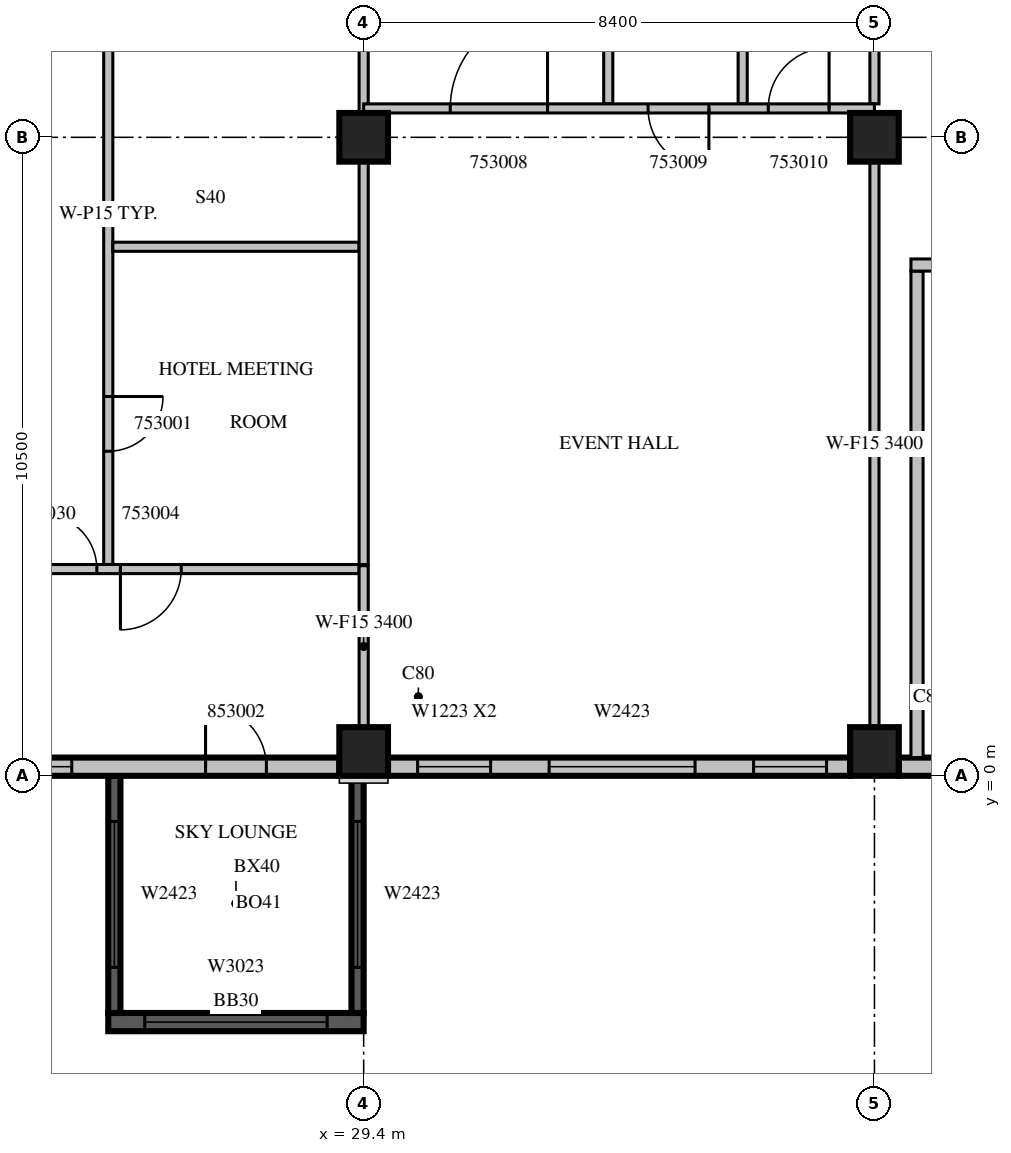
"""IFC4 building model, lengths in metres.
Left out: names, types, materials, properties, quantities, classifications, styles, units other than length and angle.
Written with IfcOpenShell. Run it as: python <this file> out.ifc"""

import sys

from ifc_helpers import new_model, si_unit, direction, frame, frame_2d, origin, origin_2d, place, context, subcontext, project, spatial, rectangle, extrude, source, transform, mapped, element, fill, save


model = new_model("IFC4")
c1 = context("Model", 3, precision=1e-05, world=origin(), true_north=direction((0.0, 1.0)))
c2 = subcontext(c1, "Body", "Model", "MODEL_VIEW")
j1 = project(units=[si_unit("LENGTHUNIT", "METRE"), si_unit("PLANEANGLEUNIT", "RADIAN")], contexts=[c1])
p1 = place(None, origin())
s1 = spatial("IfcSite", under=j1, at=p1, CompositionType="ELEMENT")
p2 = place(p1, origin())
s2 = spatial("IfcBuilding", under=s1, at=p2, CompositionType="ELEMENT")
p3 = place(p2, frame((0.0, 0.0, 234.8)))
s3 = spatial("IfcBuildingStorey", under=s2, at=p3, CompositionType="ELEMENT", Elevation=234.8)
m1 = source(origin(), c2, "Body", "SweptSolid", [
    extrude(rectangle(XDim=0.8, YDim=0.8, at=origin_2d()), origin(), (0.0, 0.0, 1.0), 3.8),
])
for number, where, z_axis, x_axis in (
    (1, (29.4, 0.4, 0.0), (0.0, 0.0, 1.0), (1.0, 0.0, 0.0)),
    (2, (37.8, 0.4, 0.0), (0.0, 0.0, 1.0), (1.0, 0.0, 0.0)),
    (3, (29.4, 10.5, 0.0), (0.0, 0.0, 1.0), (1.0, 0.0, 0.0)),
    (4, (37.8, 10.5, 0.0), (0.0, 0.0, 1.0), (1.0, 0.0, 0.0)),
):
    element("IfcColumn", number, at=place(p3, frame(where, z_axis=z_axis, x_axis=x_axis)), inside=s3, PredefinedType="COLUMN", context=c2, shape_type="MappedRepresentation", body=[
        mapped(m1, transform((0.0, 0.0, 0.0), scale=1.0)),
    ])
m2 = source(origin(), c2, "Body", "SweptSolid", [
    extrude(rectangle(XDim=4.2, YDim=0.3, at=frame_2d((2.1, 0.0))), origin(), (0.0, 0.0, 1.0), 3.4),
])
p4 = place(p3, frame((25.2, -4.05, 0.0), z_axis=(0.0, 0.0, 1.0), x_axis=(1.0, 0.0, 0.0)))
e5 = element("IfcWall", 5, at=p4, inside=s3, PredefinedType="SOLIDWALL", context=c2, shape_type="MappedRepresentation", body=[
    mapped(m2, transform((0.0, 0.0, 0.0), scale=1.0)),
])
m3 = source(origin(), c2, "Body", "SweptSolid", [
    extrude(rectangle(XDim=3.0, YDim=2.3, at=frame_2d((1.5, 1.15))), frame((0.0, 0.16, 0.0), z_axis=(0.0, -1.0, 0.0), x_axis=(1.0, 0.0, 0.0)), (0.0, 0.0, 1.0), 0.32),
])
p5 = place(p4, frame((0.6, 0.0, 0.6)))
e6 = element("IfcOpeningElement", 6, at=p5, cuts=e5, PredefinedType="OPENING", context=c2, shape_type="MappedRepresentation", body=[
    mapped(m3, transform((0.0, 0.0, 0.0), scale=1.0)),
])
m4 = source(origin(), c2, "Body", "SweptSolid", [
    extrude(rectangle(XDim=3.9, YDim=0.2, at=frame_2d((1.95, 0.0))), origin(), (0.0, 0.0, 1.0), 3.4),
])
p6 = place(p3, frame((25.3, 0.0, 0.0), z_axis=(0.0, 0.0, 1.0), x_axis=(0.0, -1.0, 0.0)))
e7 = element("IfcWall", 7, at=p6, inside=s3, PredefinedType="SOLIDWALL", context=c2, shape_type="MappedRepresentation", body=[
    mapped(m4, transform((0.0, 0.0, 0.0), scale=1.0)),
])
m5 = source(origin(), c2, "Body", "SweptSolid", [
    extrude(rectangle(XDim=2.4, YDim=2.3, at=frame_2d((1.2, 1.15))), frame((0.0, 0.11, 0.0), z_axis=(0.0, -1.0, 0.0), x_axis=(1.0, 0.0, 0.0)), (0.0, 0.0, 1.0), 0.22),
])
p7 = place(p6, frame((0.75, 0.0, 0.6)))
e8 = element("IfcOpeningElement", 8, at=p7, cuts=e7, PredefinedType="OPENING", context=c2, shape_type="MappedRepresentation", body=[
    mapped(m5, transform((0.0, 0.0, 0.0), scale=1.0)),
])
p8 = place(p3, frame((29.3, 0.0, 0.0), z_axis=(0.0, 0.0, 1.0), x_axis=(0.0, -1.0, 0.0)))
e9 = element("IfcWall", 9, at=p8, inside=s3, PredefinedType="SOLIDWALL", context=c2, shape_type="MappedRepresentation", body=[
    mapped(m4, transform((0.0, 0.0, 0.0), scale=1.0)),
])
p9 = place(p8, frame((0.75, 0.0, 0.6)))
e10 = element("IfcOpeningElement", 10, at=p9, cuts=e9, PredefinedType="OPENING", context=c2, shape_type="MappedRepresentation", body=[
    mapped(m5, transform((0.0, 0.0, 0.0), scale=1.0)),
])
m6 = source(origin(), c2, "Body", "SweptSolid", [
    extrude(rectangle(XDim=7.6, YDim=0.3, at=frame_2d((3.8, 0.0))), origin(), (0.0, 0.0, 1.0), 3.4),
])
p10 = place(p3, frame((21.4, 0.15, 0.0), z_axis=(0.0, 0.0, 1.0), x_axis=(1.0, 0.0, 0.0)))
e11 = element("IfcWall", 11, at=p10, inside=s3, PredefinedType="STANDARD", context=c2, shape_type="MappedRepresentation", body=[
    mapped(m6, transform((0.0, 0.0, 0.0), scale=1.0)),
])
p11 = place(p10, frame((0.2, 0.0, 0.6)))
e12 = element("IfcOpeningElement", 12, at=p11, cuts=e11, PredefinedType="OPENING", context=c2, shape_type="MappedRepresentation", body=[
    mapped(m3, transform((0.0, 0.0, 0.0), scale=1.0)),
])
m7 = source(origin(), c2, "Body", "SweptSolid", [
    extrude(rectangle(XDim=1.0, YDim=2.1, at=frame_2d((0.5, 1.05))), frame((0.0, 0.16, 0.0), z_axis=(0.0, -1.0, 0.0), x_axis=(1.0, 0.0, 0.0)), (0.0, 0.0, 1.0), 0.32),
])
p12 = place(p10, frame((5.4, 0.0, 0.0)))
e13 = element("IfcOpeningElement", 13, at=p12, cuts=e11, PredefinedType="OPENING", context=c2, shape_type="MappedRepresentation", body=[
    mapped(m7, transform((0.0, 0.0, 0.0), scale=1.0)),
])
p13 = place(p3, frame((29.8, 0.15, 0.0), z_axis=(0.0, 0.0, 1.0), x_axis=(1.0, 0.0, 0.0)))
e14 = element("IfcWall", 14, at=p13, inside=s3, PredefinedType="STANDARD", context=c2, shape_type="MappedRepresentation", body=[
    mapped(m6, transform((0.0, 0.0, 0.0), scale=1.0)),
])
m8 = source(origin(), c2, "Body", "SweptSolid", [
    extrude(rectangle(XDim=1.2, YDim=2.3, at=frame_2d((0.6, 1.15))), frame((0.0, 0.16, 0.0), z_axis=(0.0, -1.0, 0.0), x_axis=(1.0, 0.0, 0.0)), (0.0, 0.0, 1.0), 0.32),
])
p14 = place(p13, frame((0.487, 0.0, 0.6)))
e15 = element("IfcOpeningElement", 15, at=p14, cuts=e14, PredefinedType="OPENING", context=c2, shape_type="MappedRepresentation", body=[
    mapped(m8, transform((0.0, 0.0, 0.0), scale=1.0)),
])
p15 = place(p13, frame((6.013, 0.0, 0.6)))
e16 = element("IfcOpeningElement", 16, at=p15, cuts=e14, PredefinedType="OPENING", context=c2, shape_type="MappedRepresentation", body=[
    mapped(m8, transform((0.0, 0.0, 0.0), scale=1.0)),
])
m9 = source(origin(), c2, "Body", "SweptSolid", [
    extrude(rectangle(XDim=2.4, YDim=2.3, at=frame_2d((1.2, 1.15))), frame((0.0, 0.16, 0.0), z_axis=(0.0, -1.0, 0.0), x_axis=(1.0, 0.0, 0.0)), (0.0, 0.0, 1.0), 0.32),
])
p16 = place(p13, frame((2.65, 0.0, 0.6)))
e17 = element("IfcOpeningElement", 17, at=p16, cuts=e14, PredefinedType="OPENING", context=c2, shape_type="MappedRepresentation", body=[
    mapped(m9, transform((0.0, 0.0, 0.0), scale=1.0)),
])
m10 = source(origin(), c2, "Body", "SweptSolid", [
    extrude(rectangle(XDim=2.0, YDim=0.3, at=frame_2d((1.0, 0.0))), origin(), (0.0, 0.0, 1.0), 3.4),
])
p17 = place(p3, frame((38.2, 0.15, 0.0), z_axis=(0.0, 0.0, 1.0), x_axis=(1.0, 0.0, 0.0)))
e18 = element("IfcWall", 18, at=p17, inside=s3, PredefinedType="STANDARD", context=c2, shape_type="MappedRepresentation", body=[
    mapped(m10, transform((0.0, 0.0, 0.0), scale=1.0)),
])
m11 = source(origin(), c2, "Body", "SweptSolid", [
    extrude(rectangle(XDim=8.0, YDim=0.2, at=frame_2d((4.0, 0.0))), origin(), (0.0, 0.0, 1.0), 3.4),
])
p18 = place(p3, frame((38.5, 0.3, 0.0), z_axis=(0.0, 0.0, 1.0), x_axis=(0.0, 1.0, 0.0)))
e19 = element("IfcWall", 19, at=p18, inside=s3, PredefinedType="PARTITIONING", context=c2, shape_type="MappedRepresentation", body=[
    mapped(m11, transform((0.0, 0.0, 0.0), scale=1.0)),
])
m12 = source(origin(), c2, "Body", "SweptSolid", [
    extrude(rectangle(XDim=5.45, YDim=0.2, at=frame_2d((2.725, 0.0))), origin(), (0.0, 0.0, 1.0), 3.4),
])
p19 = place(p3, frame((38.4, 8.4, 0.0), z_axis=(0.0, 0.0, 1.0), x_axis=(1.0, 0.0, 0.0)))
e20 = element("IfcWall", 20, at=p19, inside=s3, PredefinedType="PARTITIONING", context=c2, shape_type="MappedRepresentation", body=[
    mapped(m12, transform((0.0, 0.0, 0.0), scale=1.0)),
])
m13 = source(origin(), c2, "Body", "SweptSolid", [
    extrude(rectangle(XDim=1.2, YDim=2.1, at=frame_2d((0.6, 1.05))), frame((0.0, 0.11, 0.0), z_axis=(0.0, -1.0, 0.0), x_axis=(1.0, 0.0, 0.0)), (0.0, 0.0, 1.0), 0.22),
])
p20 = place(p19, frame((0.4, 0.0, 0.0)))
e21 = element("IfcOpeningElement", 21, at=p20, cuts=e20, PredefinedType="OPENING", context=c2, shape_type="MappedRepresentation", body=[
    mapped(m13, transform((0.0, 0.0, 0.0), scale=1.0)),
])
m14 = source(origin(), c2, "Body", "SweptSolid", [
    extrude(rectangle(XDim=0.9, YDim=2.1, at=frame_2d((0.45, 1.05))), frame((0.0, 0.11, 0.0), z_axis=(0.0, -1.0, 0.0), x_axis=(1.0, 0.0, 0.0)), (0.0, 0.0, 1.0), 0.22),
])
p21 = place(p19, frame((3.25, 0.0, 0.0)))
e22 = element("IfcOpeningElement", 22, at=p21, cuts=e20, PredefinedType="OPENING", context=c2, shape_type="MappedRepresentation", body=[
    mapped(m14, transform((0.0, 0.0, 0.0), scale=1.0)),
])
m15 = source(origin(), c2, "Body", "SweptSolid", [
    extrude(rectangle(XDim=11.525, YDim=0.15, at=frame_2d((5.763, 0.0))), origin(), (0.0, 0.0, 1.0), 3.4),
])
p22 = place(p3, frame((25.2, 15.0, 0.0), z_axis=(0.0, 0.0, 1.0), x_axis=(0.0, -1.0, 0.0)))
e23 = element("IfcWall", 23, at=p22, inside=s3, PredefinedType="PARTITIONING", context=c2, shape_type="MappedRepresentation", body=[
    mapped(m15, transform((0.0, 0.0, 0.0), scale=1.0)),
])
m16 = source(origin(), c2, "Body", "SweptSolid", [
    extrude(rectangle(XDim=0.9, YDim=2.1, at=frame_2d((0.45, 1.05))), frame((0.0, 0.085, 0.0), z_axis=(0.0, -1.0, 0.0), x_axis=(1.0, 0.0, 0.0)), (0.0, 0.0, 1.0), 0.17),
])
p23 = place(p22, frame((8.762, 0.0, 0.0)))
e24 = element("IfcOpeningElement", 24, at=p23, cuts=e23, PredefinedType="OPENING", context=c2, shape_type="MappedRepresentation", body=[
    mapped(m16, transform((0.0, 0.0, 0.0), scale=1.0)),
])
p24 = place(p22, frame((2.125, 0.0, 0.0)))
e25 = element("IfcOpeningElement", 25, at=p24, cuts=e23, PredefinedType="OPENING", context=c2, shape_type="MappedRepresentation", body=[
    mapped(m16, transform((0.0, 0.0, 0.0), scale=1.0)),
])
m17 = source(origin(), c2, "Body", "SweptSolid", [
    extrude(rectangle(XDim=4.05, YDim=0.15, at=frame_2d((2.025, 0.0))), origin(), (0.0, 0.0, 1.0), 3.4),
])
p25 = place(p3, frame((29.325, 8.7, 0.0), z_axis=(0.0, 0.0, 1.0), x_axis=(-1.0, 0.0, 0.0)))
e26 = element("IfcWall", 26, at=p25, inside=s3, PredefinedType="PARTITIONING", context=c2, shape_type="MappedRepresentation", body=[
    mapped(m17, transform((0.0, 0.0, 0.0), scale=1.0)),
])
m18 = source(origin(), c2, "Body", "SweptSolid", [
    extrude(rectangle(XDim=6.626, YDim=0.15, at=frame_2d((3.313, 0.0))), origin(), (0.0, 0.0, 1.0), 3.4),
])
p26 = place(p3, frame((29.4, 3.475, 0.0), z_axis=(0.0, 0.0, 1.0), x_axis=(0.0, 1.0, 0.0)))
e27 = element("IfcWall", 27, at=p26, inside=s3, PredefinedType="PARTITIONING", context=c2, shape_type="MappedRepresentation", body=[
    mapped(m18, transform((0.0, 0.0, 0.0), scale=1.0)),
])
m19 = source(origin(), c2, "Body", "SweptSolid", [
    extrude(rectangle(XDim=4.101, YDim=0.15, at=frame_2d((2.05, 0.0))), origin(), (0.0, 0.0, 1.0), 3.4),
])
p27 = place(p3, frame((29.4, 10.899, 0.0), z_axis=(0.0, 0.0, 1.0), x_axis=(0.0, 1.0, 0.0)))
e28 = element("IfcWall", 28, at=p27, inside=s3, PredefinedType="PARTITIONING", context=c2, shape_type="MappedRepresentation", body=[
    mapped(m19, transform((0.0, 0.0, 0.0), scale=1.0)),
])
m20 = source(origin(), c2, "Body", "SweptSolid", [
    extrude(rectangle(XDim=7.525, YDim=0.15, at=frame_2d((3.763, 0.0))), origin(), (0.0, 0.0, 1.0), 3.4),
])
p28 = place(p3, frame((21.8, 3.4, 0.0), z_axis=(0.0, 0.0, 1.0), x_axis=(1.0, 0.0, 0.0)))
e29 = element("IfcWall", 29, at=p28, inside=s3, PredefinedType="PARTITIONING", context=c2, shape_type="MappedRepresentation", body=[
    mapped(m20, transform((0.0, 0.0, 0.0), scale=1.0)),
])
m21 = source(origin(), c2, "Body", "SweptSolid", [
    extrude(rectangle(XDim=1.0, YDim=2.1, at=frame_2d((0.5, 1.05))), frame((0.0, 0.085, 0.0), z_axis=(0.0, -1.0, 0.0), x_axis=(1.0, 0.0, 0.0)), (0.0, 0.0, 1.0), 0.17),
])
p29 = place(p28, frame((3.6, 0.0, 0.0)))
e30 = element("IfcOpeningElement", 30, at=p29, cuts=e29, PredefinedType="OPENING", context=c2, shape_type="MappedRepresentation", body=[
    mapped(m21, transform((0.0, 0.0, 0.0), scale=1.0)),
])
p30 = place(p28, frame((2.312, 0.0, 0.0)))
e31 = element("IfcOpeningElement", 31, at=p30, cuts=e29, PredefinedType="OPENING", context=c2, shape_type="MappedRepresentation", body=[
    mapped(m16, transform((0.0, 0.0, 0.0), scale=1.0)),
])
m22 = source(origin(), c2, "Body", "SweptSolid", [
    extrude(rectangle(XDim=3.95, YDim=0.15, at=frame_2d((1.975, 0.0))), origin(), (0.0, 0.0, 1.0), 3.4),
])
for number, where, z_axis, x_axis in (
    (32, (33.422, 11.05, 0.0), (0.0, 0.0, 1.0), (0.0, 1.0, 0.0)),
    (33, (35.633, 11.05, 0.0), (0.0, 0.0, 1.0), (0.0, 1.0, 0.0)),
):
    element("IfcWall", number, at=place(p3, frame(where, z_axis=z_axis, x_axis=x_axis)), inside=s3, PredefinedType="PARTITIONING", context=c2, shape_type="MappedRepresentation", body=[
        mapped(m22, transform((0.0, 0.0, 0.0), scale=1.0)),
    ])
m23 = source(origin(), c2, "Body", "SweptSolid", [
    extrude(rectangle(XDim=2.656, YDim=0.15, at=frame_2d((1.328, 0.0))), origin(), (0.0, 0.0, 1.0), 3.4),
])
p31 = place(p3, frame((29.4, 0.799, 0.0), z_axis=(0.0, 0.0, 1.0), x_axis=(0.0, 1.0, 0.0)))
e34 = element("IfcWall", 34, at=p31, inside=s3, PredefinedType="PARTITIONING", context=c2, shape_type="MappedRepresentation", body=[
    mapped(m23, transform((0.0, 0.0, 0.0), scale=1.0)),
])
m24 = source(origin(), c2, "Body", "SweptSolid", [
    extrude(rectangle(XDim=9.302, YDim=0.15, at=frame_2d((4.651, 0.0))), origin(), (0.0, 0.0, 1.0), 3.4),
])
p32 = place(p3, frame((37.8, 0.799, 0.0), z_axis=(0.0, 0.0, 1.0), x_axis=(0.0, 1.0, 0.0)))
e35 = element("IfcWall", 35, at=p32, inside=s3, PredefinedType="PARTITIONING", context=c2, shape_type="MappedRepresentation", body=[
    mapped(m24, transform((0.0, 0.0, 0.0), scale=1.0)),
])
p33 = place(p3, frame((37.8, 11.05, 0.0), z_axis=(0.0, 0.0, 1.0), x_axis=(0.0, 1.0, 0.0)))
e36 = element("IfcWall", 36, at=p33, inside=s3, PredefinedType="PARTITIONING", context=c2, shape_type="MappedRepresentation", body=[
    mapped(m22, transform((0.0, 0.0, 0.0), scale=1.0)),
])
m25 = source(origin(), c2, "Body", "SweptSolid", [
    extrude(rectangle(XDim=8.4, YDim=0.15, at=frame_2d((4.2, 0.0))), origin(), (0.0, 0.0, 1.0), 3.4),
])
p34 = place(p3, frame((37.8, 10.975, 0.0), z_axis=(0.0, 0.0, 1.0), x_axis=(-1.0, 0.0, 0.0)))
e37 = element("IfcWall", 37, at=p34, inside=s3, PredefinedType="PARTITIONING", context=c2, shape_type="MappedRepresentation", body=[
    mapped(m25, transform((0.0, 0.0, 0.0), scale=1.0)),
])
m26 = source(origin(), c2, "Body", "SweptSolid", [
    extrude(rectangle(XDim=1.6, YDim=2.1, at=frame_2d((0.8, 1.05))), frame((0.0, 0.085, 0.0), z_axis=(0.0, -1.0, 0.0), x_axis=(1.0, 0.0, 0.0)), (0.0, 0.0, 1.0), 0.17),
])
p35 = place(p34, frame((5.376, 0.0, 0.0)))
e38 = element("IfcOpeningElement", 38, at=p35, cuts=e37, PredefinedType="OPENING", context=c2, shape_type="MappedRepresentation", body=[
    mapped(m26, transform((0.0, 0.0, 0.0), scale=1.0)),
])
p36 = place(p34, frame((2.722, 0.0, 0.0)))
e39 = element("IfcOpeningElement", 39, at=p36, cuts=e37, PredefinedType="OPENING", context=c2, shape_type="MappedRepresentation", body=[
    mapped(m21, transform((0.0, 0.0, 0.0), scale=1.0)),
])
p37 = place(p34, frame((0.746, 0.0, 0.0)))
e40 = element("IfcOpeningElement", 40, at=p37, cuts=e37, PredefinedType="OPENING", context=c2, shape_type="MappedRepresentation", body=[
    mapped(m21, transform((0.0, 0.0, 0.0), scale=1.0)),
])
m27 = source(origin(), c2, "Body", "SweptSolid", [
    extrude(rectangle(XDim=3.0, YDim=2.3, at=frame_2d((1.5, 1.15))), frame((0.0, 0.03, 0.0), z_axis=(0.0, -1.0, 0.0), x_axis=(1.0, 0.0, 0.0)), (0.0, 0.0, 1.0), 0.06),
])
p38 = place(p5, origin())
e41 = element("IfcWindow", 41, at=p38, inside=s3, PartitioningType="SINGLE_PANEL", PredefinedType="WINDOW", context=c2, shape_type="MappedRepresentation", body=[
    mapped(m27, transform((0.0, 0.0, 0.0), scale=1.0)),
])
fill(e6, e41)
m28 = source(origin(), c2, "Body", "SweptSolid", [
    extrude(rectangle(XDim=2.4, YDim=2.3, at=frame_2d((1.2, 1.15))), frame((0.0, 0.03, 0.0), z_axis=(0.0, -1.0, 0.0), x_axis=(1.0, 0.0, 0.0)), (0.0, 0.0, 1.0), 0.06),
])
p39 = place(p7, origin())
e42 = element("IfcWindow", 42, at=p39, inside=s3, PartitioningType="SINGLE_PANEL", PredefinedType="WINDOW", context=c2, shape_type="MappedRepresentation", body=[
    mapped(m28, transform((0.0, 0.0, 0.0), scale=1.0)),
])
fill(e8, e42)
p40 = place(p9, origin())
e43 = element("IfcWindow", 43, at=p40, inside=s3, PartitioningType="SINGLE_PANEL", PredefinedType="WINDOW", context=c2, shape_type="MappedRepresentation", body=[
    mapped(m28, transform((0.0, 0.0, 0.0), scale=1.0)),
])
fill(e10, e43)
p41 = place(p11, origin())
e44 = element("IfcWindow", 44, at=p41, inside=s3, PartitioningType="SINGLE_PANEL", PredefinedType="WINDOW", context=c2, shape_type="MappedRepresentation", body=[
    mapped(m27, transform((0.0, 0.0, 0.0), scale=1.0)),
])
fill(e12, e44)
m29 = source(origin(), c2, "Body", "SweptSolid", [
    extrude(rectangle(XDim=1.2, YDim=2.3, at=frame_2d((0.6, 1.15))), frame((0.0, 0.03, 0.0), z_axis=(0.0, -1.0, 0.0), x_axis=(1.0, 0.0, 0.0)), (0.0, 0.0, 1.0), 0.06),
])
p42 = place(p14, origin())
e45 = element("IfcWindow", 45, at=p42, inside=s3, PartitioningType="SINGLE_PANEL", PredefinedType="WINDOW", context=c2, shape_type="MappedRepresentation", body=[
    mapped(m29, transform((0.0, 0.0, 0.0), scale=1.0)),
])
fill(e15, e45)
p43 = place(p15, origin())
e46 = element("IfcWindow", 46, at=p43, inside=s3, PartitioningType="SINGLE_PANEL", PredefinedType="WINDOW", context=c2, shape_type="MappedRepresentation", body=[
    mapped(m29, transform((0.0, 0.0, 0.0), scale=1.0)),
])
fill(e16, e46)
p44 = place(p16, origin())
e47 = element("IfcWindow", 47, at=p44, inside=s3, PartitioningType="SINGLE_PANEL", PredefinedType="WINDOW", context=c2, shape_type="MappedRepresentation", body=[
    mapped(m28, transform((0.0, 0.0, 0.0), scale=1.0)),
])
fill(e17, e47)
m30 = source(origin(), c2, "Body", "SweptSolid", [
    extrude(rectangle(XDim=0.9, YDim=2.1, at=frame_2d((0.45, 1.05))), frame((0.0, 0.025, 0.0), z_axis=(0.0, -1.0, 0.0), x_axis=(1.0, 0.0, 0.0)), (0.0, 0.0, 1.0), 0.05),
])
p45 = place(p23, origin())
e48 = element("IfcDoor", 48, at=p45, inside=s3, OperationType="SINGLE_SWING_LEFT", PredefinedType="DOOR", context=c2, shape_type="MappedRepresentation", body=[
    mapped(m30, transform((0.0, 0.0, 0.0), scale=1.0)),
])
fill(e24, e48)
m31 = source(origin(), c2, "Body", "SweptSolid", [
    extrude(rectangle(XDim=1.0, YDim=2.1, at=frame_2d((0.5, 1.05))), frame((0.0, 0.025, 0.0), z_axis=(0.0, -1.0, 0.0), x_axis=(1.0, 0.0, 0.0)), (0.0, 0.0, 1.0), 0.05),
])
p46 = place(p29, origin())
e49 = element("IfcDoor", 49, at=p46, inside=s3, OperationType="SINGLE_SWING_RIGHT", PredefinedType="DOOR", context=c2, shape_type="MappedRepresentation", body=[
    mapped(m31, transform((0.0, 0.0, 0.0), scale=1.0)),
])
fill(e30, e49)
m32 = source(origin(), c2, "Body", "SweptSolid", [
    extrude(rectangle(XDim=1.6, YDim=2.1, at=frame_2d((0.8, 1.05))), frame((0.0, 0.025, 0.0), z_axis=(0.0, -1.0, 0.0), x_axis=(1.0, 0.0, 0.0)), (0.0, 0.0, 1.0), 0.05),
])
p47 = place(p35, origin())
e50 = element("IfcDoor", 50, at=p47, inside=s3, OperationType="SINGLE_SWING_RIGHT", PredefinedType="DOOR", context=c2, shape_type="MappedRepresentation", body=[
    mapped(m32, transform((0.0, 0.0, 0.0), scale=1.0)),
])
fill(e38, e50)
p48 = place(p36, origin())
e51 = element("IfcDoor", 51, at=p48, inside=s3, OperationType="SINGLE_SWING_LEFT", PredefinedType="DOOR", context=c2, shape_type="MappedRepresentation", body=[
    mapped(m31, transform((0.0, 0.0, 0.0), scale=1.0)),
])
fill(e39, e51)
p49 = place(p37, origin())
e52 = element("IfcDoor", 52, at=p49, inside=s3, OperationType="SINGLE_SWING_RIGHT", PredefinedType="DOOR", context=c2, shape_type="MappedRepresentation", body=[
    mapped(m31, transform((0.0, 0.0, 0.0), scale=1.0)),
])
fill(e40, e52)
p50 = place(p30, origin())
e53 = element("IfcDoor", 53, at=p50, inside=s3, OperationType="SINGLE_SWING_LEFT", PredefinedType="DOOR", context=c2, shape_type="MappedRepresentation", body=[
    mapped(m30, transform((0.0, 0.0, 0.0), scale=1.0)),
])
fill(e31, e53)
p51 = place(p12, origin())
e54 = element("IfcDoor", 54, at=p51, inside=s3, OperationType="SINGLE_SWING_LEFT", PredefinedType="DOOR", context=c2, shape_type="MappedRepresentation", body=[
    mapped(m31, transform((0.0, 0.0, 0.0), scale=1.0)),
])
fill(e13, e54)
save(model, sys.argv[1])
